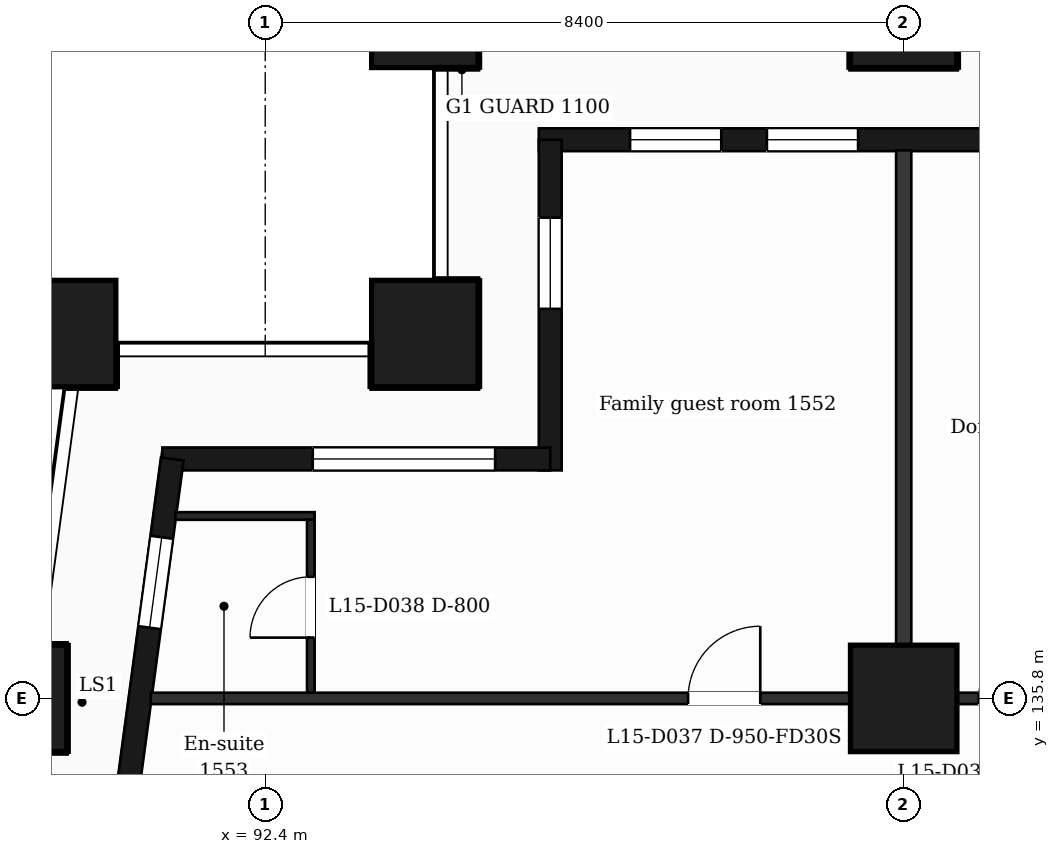
"""IFC4 building model, lengths in metres.
Left out: names, types, materials, properties, quantities, classifications, styles, units other than length and angle.
Written with IfcOpenShell. Run it as: python <this file> out.ifc"""

import sys

from ifc_helpers import new_model, si_unit, direction, frame, frame_2d, origin, origin_2d, place, context, subcontext, project, spatial, rectangle, extrude, element, fill, save


model = new_model("IFC4")
c1 = context("Model", 3, precision=1e-05, world=origin(), true_north=direction((0.0, 1.0)))
c2 = subcontext(c1, "Body", "Model", "MODEL_VIEW")
j1 = project(units=[si_unit("LENGTHUNIT", "METRE"), si_unit("PLANEANGLEUNIT", "RADIAN")], contexts=[c1])
p1 = place(None, origin())
s1 = spatial("IfcSite", under=j1, at=p1, CompositionType="ELEMENT")
p2 = place(p1, origin())
s2 = spatial("IfcBuilding", under=s1, at=p2, CompositionType="ELEMENT")
p3 = place(p2, frame((0.0, 0.0, 70.5)))
s3 = spatial("IfcBuildingStorey", under=s2, at=p3, CompositionType="ELEMENT", Elevation=70.5)
for number, where, z_axis, x_axis in (
    (1, (94.5, 140.6, 0.0), (0.0, 0.0, 1.0), (1.0, 0.0, 0.0)),
    (2, (89.735, 140.6, 0.0), (0.0, 0.0, 1.0), (1.0, 0.0, 0.0)),
    (3, (100.8, 135.8, 0.0), (0.0, 0.0, 1.0), (1.0, 0.0, 0.0)),
    (4, (89.088, 135.8, 0.0), (0.0, 0.0, 1.0), (1.0, 0.0, 0.0)),
    (5, (100.8, 144.8, 0.0), (0.0, 0.0, 1.0), (1.0, 0.0, 0.0)),
    (6, (94.5, 144.8, 0.0), (0.0, 0.0, 1.0), (1.0, 0.0, 0.0)),
):
    element("IfcColumn", number, at=place(p3, frame(where, z_axis=z_axis, x_axis=x_axis)), inside=s3, PredefinedType="COLUMN", context=c2, shape_type="SweptSolid", body=[
        extrude(rectangle(XDim=1.4, YDim=1.4, at=origin_2d()), origin(), (0.0, 0.0, 1.0), 3.5),
    ])
p4 = place(p3, frame((112.5, 143.15, 0.0), z_axis=(0.0, 0.0, 1.0), x_axis=(-1.0, 0.0, 0.0)))
e7 = element("IfcWall", 7, at=p4, inside=s3, PredefinedType="SOLIDWALL", context=c2, shape_type="SweptSolid", body=[
    extrude(rectangle(XDim=16.5, YDim=0.3, at=frame_2d((8.25, 0.0))), origin(), (0.0, 0.0, 1.0), 3.18),
])
p5 = place(p4, frame((1.1, 0.0, 0.9)))
e8 = element("IfcOpeningElement", 8, at=p5, cuts=e7, PredefinedType="OPENING", context=c2, shape_type="SweptSolid", body=[
    extrude(rectangle(XDim=1.2, YDim=2.1, at=frame_2d((0.6, 1.05))), frame((0.0, 0.16, 0.0), z_axis=(0.0, -1.0, 0.0), x_axis=(1.0, 0.0, 0.0)), (0.0, 0.0, 1.0), 0.32),
])
p6 = place(p4, frame((4.2, 0.0, 0.9)))
e9 = element("IfcOpeningElement", 9, at=p6, cuts=e7, PredefinedType="OPENING", context=c2, shape_type="SweptSolid", body=[
    extrude(rectangle(XDim=2.4, YDim=2.1, at=frame_2d((1.2, 1.05))), frame((0.0, 0.16, 0.0), z_axis=(0.0, -1.0, 0.0), x_axis=(1.0, 0.0, 0.0)), (0.0, 0.0, 1.0), 0.32),
])
p7 = place(p4, frame((9.0, 0.0, 0.0)))
e10 = element("IfcOpeningElement", 10, at=p7, cuts=e7, PredefinedType="OPENING", context=c2, shape_type="SweptSolid", body=[
    extrude(rectangle(XDim=1.2, YDim=2.4, at=frame_2d((0.6, 1.2))), frame((0.0, 0.16, 0.0), z_axis=(0.0, -1.0, 0.0), x_axis=(1.0, 0.0, 0.0)), (0.0, 0.0, 1.0), 0.32),
])
p8 = place(p4, frame((12.3, 0.0, 0.9)))
e11 = element("IfcOpeningElement", 11, at=p8, cuts=e7, PredefinedType="OPENING", context=c2, shape_type="SweptSolid", body=[
    extrude(rectangle(XDim=1.2, YDim=2.1, at=frame_2d((0.6, 1.05))), frame((0.0, 0.16, 0.0), z_axis=(0.0, -1.0, 0.0), x_axis=(1.0, 0.0, 0.0)), (0.0, 0.0, 1.0), 0.32),
])
p9 = place(p4, frame((14.1, 0.0, 0.9)))
e12 = element("IfcOpeningElement", 12, at=p9, cuts=e7, PredefinedType="OPENING", context=c2, shape_type="SweptSolid", body=[
    extrude(rectangle(XDim=1.2, YDim=2.1, at=frame_2d((0.6, 1.05))), frame((0.0, 0.16, 0.0), z_axis=(0.0, -1.0, 0.0), x_axis=(1.0, 0.0, 0.0)), (0.0, 0.0, 1.0), 0.32),
])
p10 = place(p3, frame((96.15, 143.15, 0.0), z_axis=(0.0, 0.0, 1.0), x_axis=(0.0, -1.0, 0.0)))
e13 = element("IfcWall", 13, at=p10, inside=s3, PredefinedType="SOLIDWALL", context=c2, shape_type="SweptSolid", body=[
    extrude(rectangle(XDim=4.35, YDim=0.3, at=frame_2d((2.175, 0.0))), origin(), (0.0, 0.0, 1.0), 3.18),
])
p11 = place(p10, frame((1.025, 0.0, 0.9)))
e14 = element("IfcOpeningElement", 14, at=p11, cuts=e13, PredefinedType="OPENING", context=c2, shape_type="SweptSolid", body=[
    extrude(rectangle(XDim=1.2, YDim=2.1, at=frame_2d((0.6, 1.05))), frame((0.0, 0.16, 0.0), z_axis=(0.0, -1.0, 0.0), x_axis=(1.0, 0.0, 0.0)), (0.0, 0.0, 1.0), 0.32),
])
p12 = place(p3, frame((96.15, 138.95, 0.0), z_axis=(0.0, 0.0, 1.0), x_axis=(-1.0, 0.0, 0.0)))
e15 = element("IfcWall", 15, at=p12, inside=s3, PredefinedType="SOLIDWALL", context=c2, shape_type="SweptSolid", body=[
    extrude(rectangle(XDim=5.104, YDim=0.3, at=frame_2d((2.552, 0.0))), origin(), (0.0, 0.0, 1.0), 3.18),
])
p13 = place(p12, frame((0.725, 0.0, 0.9)))
e16 = element("IfcOpeningElement", 16, at=p13, cuts=e15, PredefinedType="OPENING", context=c2, shape_type="SweptSolid", body=[
    extrude(rectangle(XDim=2.4, YDim=2.1, at=frame_2d((1.2, 1.05))), frame((0.0, 0.16, 0.0), z_axis=(0.0, -1.0, 0.0), x_axis=(1.0, 0.0, 0.0)), (0.0, 0.0, 1.0), 0.32),
])
p14 = place(p3, frame((91.177, 138.95, 0.0), z_axis=(0.0, 0.0, 1.0), x_axis=(-0.133426664613, -0.991058689065, 0.0)))
e17 = element("IfcWall", 17, at=p14, inside=s3, PredefinedType="SOLIDWALL", context=c2, shape_type="SweptSolid", body=[
    extrude(rectangle(XDim=6.609, YDim=0.3, at=frame_2d((3.305, 0.0))), origin(), (0.0, 0.0, 1.0), 3.18),
])
p15 = place(p14, frame((1.039, 0.0, 0.9)))
e18 = element("IfcOpeningElement", 18, at=p15, cuts=e17, PredefinedType="OPENING", context=c2, shape_type="SweptSolid", body=[
    extrude(rectangle(XDim=1.2, YDim=2.1, at=frame_2d((0.6, 1.05))), frame((0.0, 0.16, 0.0), z_axis=(0.0, -1.0, 0.0), x_axis=(1.0, 0.0, 0.0)), (0.0, 0.0, 1.0), 0.32),
])
p16 = place(p14, frame((4.294, 0.0, 0.0)))
e19 = element("IfcOpeningElement", 19, at=p16, cuts=e17, PredefinedType="OPENING", context=c2, shape_type="SweptSolid", body=[
    extrude(rectangle(XDim=1.2, YDim=2.4, at=frame_2d((0.6, 1.2))), frame((0.0, 0.16, 0.0), z_axis=(0.0, -1.0, 0.0), x_axis=(1.0, 0.0, 0.0)), (0.0, 0.0, 1.0), 0.32),
])
p17 = place(p3, frame((90.895, 135.8, 0.0), z_axis=(0.0, 0.0, 1.0), x_axis=(1.0, 0.0, 0.0)))
e20 = element("IfcWall", 20, at=p17, inside=s3, PredefinedType="PARTITIONING", context=c2, shape_type="SweptSolid", body=[
    extrude(rectangle(XDim=45.011, YDim=0.15, at=frame_2d((22.505, 0.0))), origin(), (0.0, 0.0, 1.0), 3.18),
])
p18 = place(p17, frame((7.068, 0.0, 0.0)))
e21 = element("IfcOpeningElement", 21, at=p18, cuts=e20, PredefinedType="OPENING", context=c2, shape_type="SweptSolid", body=[
    extrude(rectangle(XDim=0.95, YDim=2.1, at=frame_2d((0.475, 1.05))), frame((0.0, 0.085, 0.0), z_axis=(0.0, -1.0, 0.0), x_axis=(1.0, 0.0, 0.0)), (0.0, 0.0, 1.0), 0.17),
])
p19 = place(p17, frame((10.892, 0.0, 0.0)))
e22 = element("IfcOpeningElement", 22, at=p19, cuts=e20, PredefinedType="OPENING", context=c2, shape_type="SweptSolid", body=[
    extrude(rectangle(XDim=0.95, YDim=2.1, at=frame_2d((0.475, 1.05))), frame((0.0, 0.085, 0.0), z_axis=(0.0, -1.0, 0.0), x_axis=(1.0, 0.0, 0.0)), (0.0, 0.0, 1.0), 0.17),
])
p20 = place(p17, frame((16.455, 0.0, 0.0)))
e23 = element("IfcOpeningElement", 23, at=p20, cuts=e20, PredefinedType="OPENING", context=c2, shape_type="SweptSolid", body=[
    extrude(rectangle(XDim=0.95, YDim=2.1, at=frame_2d((0.475, 1.05))), frame((0.0, 0.085, 0.0), z_axis=(0.0, -1.0, 0.0), x_axis=(1.0, 0.0, 0.0)), (0.0, 0.0, 1.0), 0.17),
])
p21 = place(p17, frame((21.918, 0.0, 0.0)))
e24 = element("IfcOpeningElement", 24, at=p21, cuts=e20, PredefinedType="OPENING", context=c2, shape_type="SweptSolid", body=[
    extrude(rectangle(XDim=0.95, YDim=2.1, at=frame_2d((0.475, 1.05))), frame((0.0, 0.085, 0.0), z_axis=(0.0, -1.0, 0.0), x_axis=(1.0, 0.0, 0.0)), (0.0, 0.0, 1.0), 0.17),
])
p22 = place(p17, frame((28.969, 0.0, 0.0)))
e25 = element("IfcOpeningElement", 25, at=p22, cuts=e20, PredefinedType="OPENING", context=c2, shape_type="SweptSolid", body=[
    extrude(rectangle(XDim=0.95, YDim=2.1, at=frame_2d((0.475, 1.05))), frame((0.0, 0.085, 0.0), z_axis=(0.0, -1.0, 0.0), x_axis=(1.0, 0.0, 0.0)), (0.0, 0.0, 1.0), 0.17),
])
p23 = place(p17, frame((32.531, 0.0, 0.0)))
e26 = element("IfcOpeningElement", 26, at=p23, cuts=e20, PredefinedType="OPENING", context=c2, shape_type="SweptSolid", body=[
    extrude(rectangle(XDim=0.95, YDim=2.1, at=frame_2d((0.475, 1.05))), frame((0.0, 0.085, 0.0), z_axis=(0.0, -1.0, 0.0), x_axis=(1.0, 0.0, 0.0)), (0.0, 0.0, 1.0), 0.17),
])
p24 = place(p17, frame((40.929, 0.0, 0.0)))
e27 = element("IfcOpeningElement", 27, at=p24, cuts=e20, PredefinedType="OPENING", context=c2, shape_type="SweptSolid", body=[
    extrude(rectangle(XDim=0.95, YDim=2.1, at=frame_2d((0.475, 1.05))), frame((0.0, 0.085, 0.0), z_axis=(0.0, -1.0, 0.0), x_axis=(1.0, 0.0, 0.0)), (0.0, 0.0, 1.0), 0.17),
])
p25 = place(p3, frame((91.218, 138.2, 0.0), z_axis=(0.0, 0.0, 1.0), x_axis=(1.0, 0.0, 0.0)))
e28 = element("IfcWall", 28, at=p25, inside=s3, PredefinedType="PARTITIONING", context=c2, shape_type="SweptSolid", body=[
    extrude(rectangle(XDim=1.832, YDim=0.1, at=frame_2d((0.916, 0.0))), origin(), (0.0, 0.0, 1.0), 3.18),
])
p26 = place(p3, frame((93.0, 135.875, 0.0), z_axis=(0.0, 0.0, 1.0), x_axis=(0.0, 1.0, 0.0)))
e29 = element("IfcWall", 29, at=p26, inside=s3, PredefinedType="PARTITIONING", context=c2, shape_type="SweptSolid", body=[
    extrude(rectangle(XDim=2.275, YDim=0.1, at=frame_2d((1.137, 0.0))), origin(), (0.0, 0.0, 1.0), 3.18),
])
p27 = place(p26, frame((0.725, 0.0, 0.0)))
e30 = element("IfcOpeningElement", 30, at=p27, cuts=e29, PredefinedType="OPENING", context=c2, shape_type="SweptSolid", body=[
    extrude(rectangle(XDim=0.8, YDim=2.1, at=frame_2d((0.4, 1.05))), frame((0.0, 0.06, 0.0), z_axis=(0.0, -1.0, 0.0), x_axis=(1.0, 0.0, 0.0)), (0.0, 0.0, 1.0), 0.12),
])
p28 = place(p3, frame((100.8, 135.875, 0.0), z_axis=(0.0, 0.0, 1.0), x_axis=(0.0, 1.0, 0.0)))
e31 = element("IfcWall", 31, at=p28, inside=s3, PredefinedType="PARTITIONING", context=c2, shape_type="SweptSolid", body=[
    extrude(rectangle(XDim=7.135, YDim=0.2, at=frame_2d((3.567, 0.0))), origin(), (0.0, 0.0, 1.0), 3.18),
])
p29 = place(p8, origin())
e32 = element("IfcWindow", 32, at=p29, inside=s3, PartitioningType="SINGLE_PANEL", PredefinedType="WINDOW", context=c2, shape_type="SweptSolid", body=[
    extrude(rectangle(XDim=1.2, YDim=2.1, at=frame_2d((0.6, 1.05))), frame((0.0, 0.03, 0.0), z_axis=(0.0, -1.0, 0.0), x_axis=(1.0, 0.0, 0.0)), (0.0, 0.0, 1.0), 0.06),
])
fill(e11, e32)
p30 = place(p9, origin())
e33 = element("IfcWindow", 33, at=p30, inside=s3, PartitioningType="SINGLE_PANEL", PredefinedType="WINDOW", context=c2, shape_type="SweptSolid", body=[
    extrude(rectangle(XDim=1.2, YDim=2.1, at=frame_2d((0.6, 1.05))), frame((0.0, 0.03, 0.0), z_axis=(0.0, -1.0, 0.0), x_axis=(1.0, 0.0, 0.0)), (0.0, 0.0, 1.0), 0.06),
])
fill(e12, e33)
p31 = place(p11, origin())
e34 = element("IfcWindow", 34, at=p31, inside=s3, PartitioningType="SINGLE_PANEL", PredefinedType="WINDOW", context=c2, shape_type="SweptSolid", body=[
    extrude(rectangle(XDim=1.2, YDim=2.1, at=frame_2d((0.6, 1.05))), frame((0.0, 0.03, 0.0), z_axis=(0.0, -1.0, 0.0), x_axis=(1.0, 0.0, 0.0)), (0.0, 0.0, 1.0), 0.06),
])
fill(e14, e34)
p32 = place(p13, origin())
e35 = element("IfcWindow", 35, at=p32, inside=s3, PartitioningType="SINGLE_PANEL", PredefinedType="WINDOW", context=c2, shape_type="SweptSolid", body=[
    extrude(rectangle(XDim=2.4, YDim=2.1, at=frame_2d((1.2, 1.05))), frame((0.0, 0.03, 0.0), z_axis=(0.0, -1.0, 0.0), x_axis=(1.0, 0.0, 0.0)), (0.0, 0.0, 1.0), 0.06),
])
fill(e16, e35)
p33 = place(p15, origin())
e36 = element("IfcWindow", 36, at=p33, inside=s3, PartitioningType="SINGLE_PANEL", PredefinedType="WINDOW", context=c2, shape_type="SweptSolid", body=[
    extrude(rectangle(XDim=1.2, YDim=2.1, at=frame_2d((0.6, 1.05))), frame((0.0, 0.03, 0.0), z_axis=(0.0, -1.0, 0.0), x_axis=(1.0, 0.0, 0.0)), (0.0, 0.0, 1.0), 0.06),
])
fill(e18, e36)
p34 = place(p18, origin())
e37 = element("IfcDoor", 37, at=p34, inside=s3, OperationType="SINGLE_SWING_RIGHT", PredefinedType="DOOR", context=c2, shape_type="SweptSolid", body=[
    extrude(rectangle(XDim=0.95, YDim=2.1, at=frame_2d((0.475, 1.05))), frame((0.0, 0.025, 0.0), z_axis=(0.0, -1.0, 0.0), x_axis=(1.0, 0.0, 0.0)), (0.0, 0.0, 1.0), 0.05),
])
fill(e21, e37)
p35 = place(p27, origin())
e38 = element("IfcDoor", 38, at=p35, inside=s3, OperationType="SINGLE_SWING_LEFT", PredefinedType="DOOR", context=c2, shape_type="SweptSolid", body=[
    extrude(rectangle(XDim=0.8, YDim=2.1, at=frame_2d((0.4, 1.05))), frame((0.0, 0.025, 0.0), z_axis=(0.0, -1.0, 0.0), x_axis=(1.0, 0.0, 0.0)), (0.0, 0.0, 1.0), 0.05),
])
fill(e30, e38)
p36 = place(p19, origin())
e39 = element("IfcDoor", 39, at=p36, inside=s3, OperationType="SINGLE_SWING_RIGHT", PredefinedType="DOOR", context=c2, shape_type="SweptSolid", body=[
    extrude(rectangle(XDim=0.95, YDim=2.1, at=frame_2d((0.475, 1.05))), frame((0.0, 0.025, 0.0), z_axis=(0.0, -1.0, 0.0), x_axis=(1.0, 0.0, 0.0)), (0.0, 0.0, 1.0), 0.05),
])
fill(e22, e39)
save(model, sys.argv[1])
